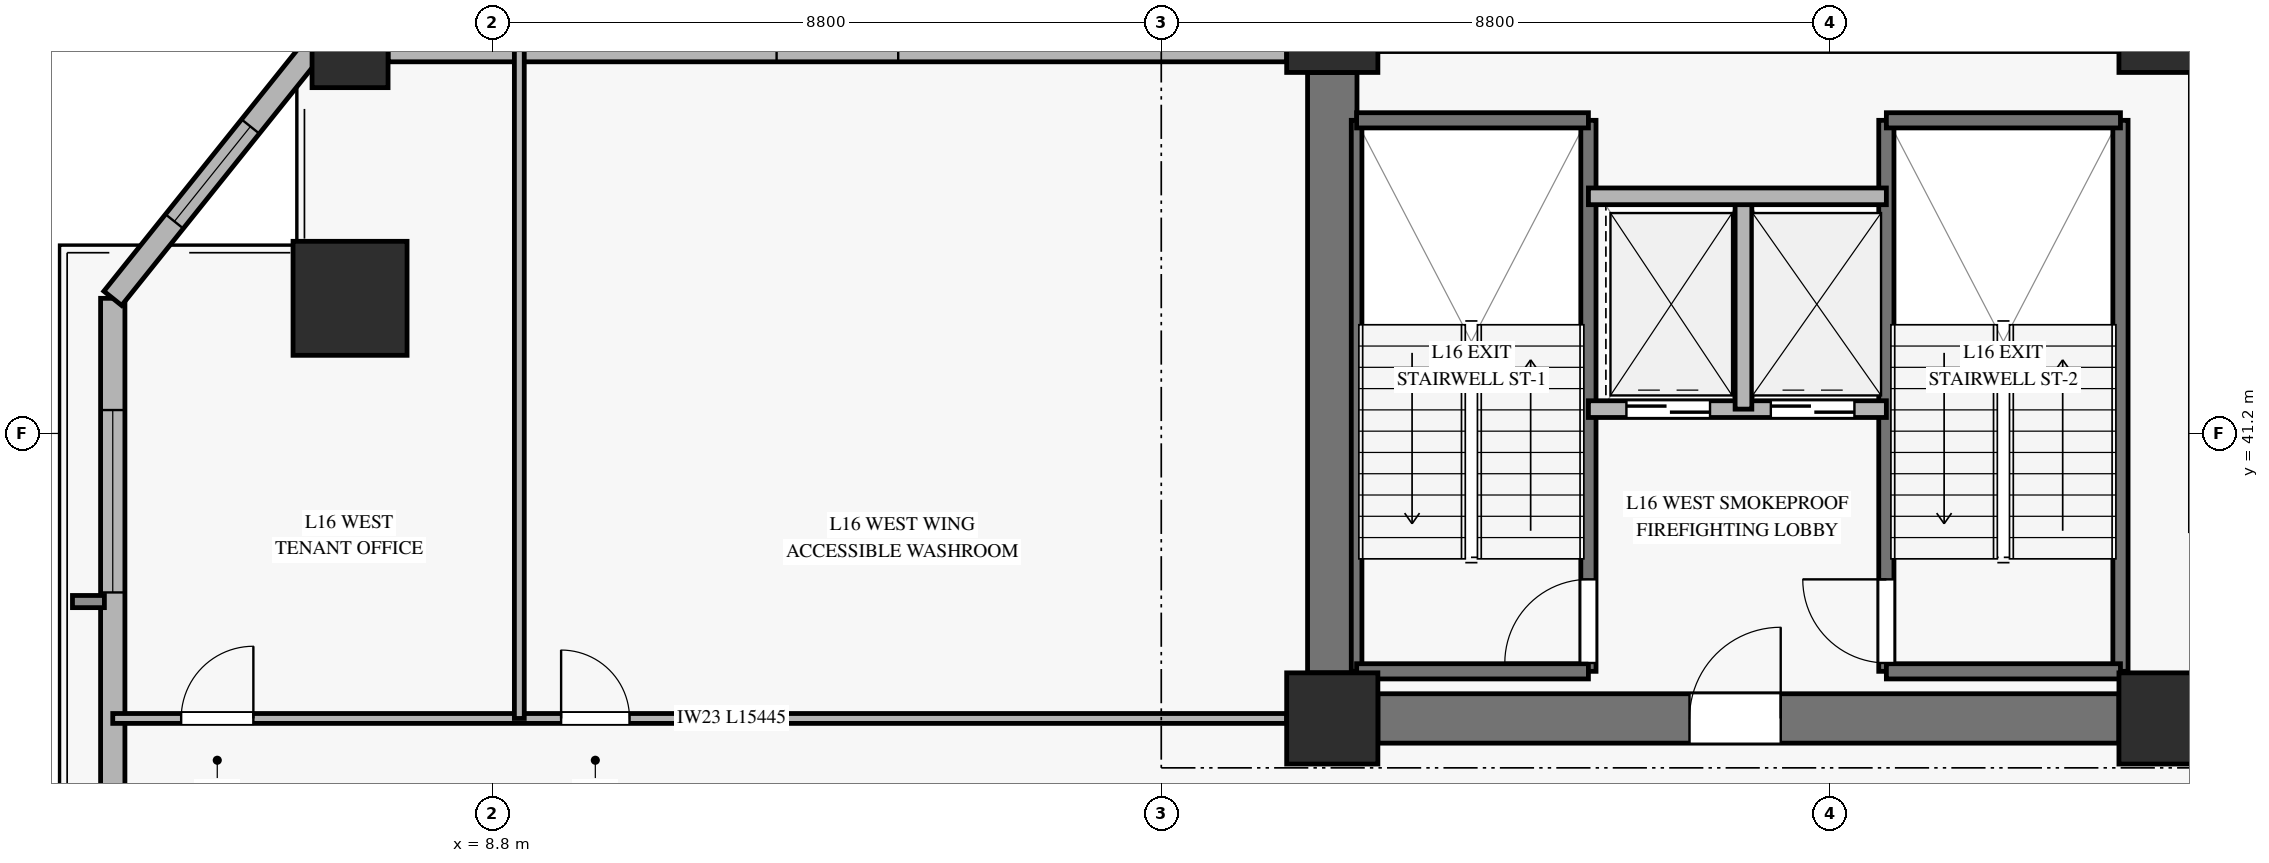
"""IFC4 building model, lengths in metres.
Left out: names, types, materials, properties, quantities, classifications, styles, units other than length and angle.
Written with IfcOpenShell. Run it as: python <this file> out.ifc"""

import sys

from ifc_helpers import new_model, si_unit, direction, frame, frame_2d, origin, origin_2d, place, context, subcontext, project, spatial, rectangle, hollow_rectangle, extrude, source, transform, mapped, element, fill, save


model = new_model("IFC4")
c1 = context("Model", 3, precision=1e-05, world=origin(), true_north=direction((0.0, 1.0)))
c2 = subcontext(c1, "Body", "Model", "MODEL_VIEW")
j1 = project(units=[si_unit("LENGTHUNIT", "METRE"), si_unit("PLANEANGLEUNIT", "RADIAN")], contexts=[c1])
p1 = place(None, origin())
s1 = spatial("IfcSite", under=j1, at=p1, CompositionType="ELEMENT")
p2 = place(p1, origin())
s2 = spatial("IfcBuilding", under=s1, at=p2, CompositionType="ELEMENT")
p3 = place(p2, frame((0.0, 0.0, 65.0)))
s3 = spatial("IfcBuildingStorey", under=s2, at=p3, CompositionType="ELEMENT", Elevation=65.0)
m1 = source(origin(), c2, "Body", "SweptSolid", [
    extrude(rectangle(XDim=1.2, YDim=1.2, at=origin_2d()), origin(), (0.0, 0.0, 1.0), 3.68),
])
for number, where, z_axis, x_axis in (
    (1, (19.85, 37.45, 0.0), (0.0, 0.0, 1.0), (1.0, 0.0, 0.0)),
    (2, (19.85, 46.55, 0.0), (0.0, 0.0, 1.0), (1.0, 0.0, 0.0)),
    (3, (30.8, 37.45, 0.0), (0.0, 0.0, 1.0), (1.0, 0.0, 0.0)),
    (4, (30.8, 46.55, 0.0), (0.0, 0.0, 1.0), (1.0, 0.0, 0.0)),
):
    element("IfcColumn", number, at=place(p3, frame(where, z_axis=z_axis, x_axis=x_axis)), inside=s3, PredefinedType="PILASTER", context=c2, shape_type="MappedRepresentation", body=[
        mapped(m1, transform((0.0, 0.0, 0.0), x_axis=(1.0, 0.0, 0.0), y_axis=(0.0, 1.0, 0.0), z_axis=(0.0, 0.0, 1.0), scale=1.0)),
    ])
p4 = place(p3, frame((20.45, 37.45, 0.0), z_axis=(0.0, 0.0, 1.0), x_axis=(1.0, 0.0, 0.0)))
e5 = element("IfcWall", 5, at=p4, inside=s3, PredefinedType="SHEAR", context=c2, shape_type="SweptSolid", body=[
    extrude(rectangle(XDim=9.75, YDim=0.65, at=frame_2d((4.875, 0.0))), origin(), (0.0, 0.0, 1.0), 3.68),
])
p5 = place(p4, frame((4.1, 0.0, 0.0)))
e6 = element("IfcOpeningElement", 6, at=p5, cuts=e5, PredefinedType="OPENING", context=c2, shape_type="SweptSolid", body=[
    extrude(rectangle(XDim=1.2, YDim=2.15, at=frame_2d((0.6, 1.075))), frame((0.0, 0.335, 0.0), z_axis=(0.0, -1.0, 0.0), x_axis=(1.0, 0.0, 0.0)), (0.0, 0.0, 1.0), 0.67),
])
p6 = place(p3, frame((19.85, 38.05, 0.0), z_axis=(0.0, 0.0, 1.0), x_axis=(0.0, 1.0, 0.0)))
e7 = element("IfcWall", 7, at=p6, inside=s3, PredefinedType="SHEAR", context=c2, shape_type="SweptSolid", body=[
    extrude(rectangle(XDim=7.9, YDim=0.65, at=frame_2d((3.95, 0.0))), origin(), (0.0, 0.0, 1.0), 3.68),
])
m2 = source(origin(), c2, "Body", "SweptSolid", [
    extrude(hollow_rectangle(XDim=1.5, YDim=1.5, WallThickness=0.07, at=origin_2d()), origin(), (0.0, 0.0, 1.0), 3.68),
])
p7 = place(p3, frame((6.927, 42.978, 0.0), z_axis=(0.0, 0.0, 1.0), x_axis=(1.0, 0.0, 0.0)))
e8 = element("IfcColumn", 8, at=p7, inside=s3, PredefinedType="COLUMN", context=c2, shape_type="MappedRepresentation", body=[
    mapped(m2, transform((0.0, 0.0, 0.0), x_axis=(1.0, 0.0, 0.0), y_axis=(0.0, 1.0, 0.0), z_axis=(0.0, 0.0, 1.0), scale=1.0)),
])
m3 = source(origin(), c2, "Body", "SweptSolid", [
    extrude(hollow_rectangle(XDim=1.0, YDim=1.0, WallThickness=0.045, at=origin_2d()), origin(), (0.0, 0.0, 1.0), 3.68),
])
p8 = place(p3, frame((6.927, 46.25, 0.0), z_axis=(0.0, 0.0, 1.0), x_axis=(1.0, 0.0, 0.0)))
e9 = element("IfcColumn", 9, at=p8, inside=s3, PredefinedType="COLUMN", context=c2, shape_type="MappedRepresentation", body=[
    mapped(m3, transform((0.0, 0.0, 0.0), x_axis=(1.0, 0.0, 0.0), y_axis=(0.0, 1.0, 0.0), z_axis=(0.0, 0.0, 1.0), scale=1.0)),
])
p9 = place(p3, frame((3.805, 25.991, 0.0), z_axis=(0.0, 0.0, 1.0), x_axis=(0.0, 1.0, 0.0)))
e10 = element("IfcWall", 10, at=p9, inside=s3, PredefinedType="SOLIDWALL", context=c2, shape_type="SweptSolid", body=[
    extrude(rectangle(XDim=16.987, YDim=0.32, at=frame_2d((8.494, 0.0))), origin(), (0.0, 0.0, 1.0), 3.16),
])
p10 = place(p9, frame((1.353, 0.0, 0.45)))
e11 = element("IfcOpeningElement", 11, at=p10, cuts=e10, PredefinedType="OPENING", context=c2, shape_type="SweptSolid", body=[
    extrude(rectangle(XDim=2.4, YDim=2.1, at=frame_2d((1.2, 1.05))), frame((0.0, 0.17, 0.0), z_axis=(0.0, -1.0, 0.0), x_axis=(1.0, 0.0, 0.0)), (0.0, 0.0, 1.0), 0.34),
])
p11 = place(p9, frame((13.117, 0.0, 0.45)))
e12 = element("IfcOpeningElement", 12, at=p11, cuts=e10, PredefinedType="OPENING", context=c2, shape_type="SweptSolid", body=[
    extrude(rectangle(XDim=2.4, YDim=2.1, at=frame_2d((1.2, 1.05))), frame((0.0, 0.17, 0.0), z_axis=(0.0, -1.0, 0.0), x_axis=(1.0, 0.0, 0.0)), (0.0, 0.0, 1.0), 0.34),
])
p12 = place(p3, frame((7.427, 46.25, 0.0), z_axis=(0.0, 0.0, 1.0), x_axis=(1.0, 0.0, 0.0)))
e13 = element("IfcWall", 13, at=p12, inside=s3, PredefinedType="SOLIDWALL", context=c2, shape_type="SweptSolid", body=[
    extrude(rectangle(XDim=11.823, YDim=0.32, at=frame_2d((5.912, 0.0))), origin(), (0.0, 0.0, 1.0), 3.16),
])
p13 = place(p12, frame((5.112, 0.0, 0.45)))
e14 = element("IfcOpeningElement", 14, at=p13, cuts=e13, PredefinedType="OPENING", context=c2, shape_type="SweptSolid", body=[
    extrude(rectangle(XDim=1.6, YDim=2.0, at=frame_2d((0.8, 1.0))), frame((0.0, 0.17, 0.0), z_axis=(0.0, -1.0, 0.0), x_axis=(1.0, 0.0, 0.0)), (0.0, 0.0, 1.0), 0.34),
])
p14 = place(p3, frame((6.427, 46.25, 0.0), z_axis=(0.0, 0.0, 1.0), x_axis=(-0.625348097159, -0.780345921614, 0.0)))
e15 = element("IfcWall", 15, at=p14, inside=s3, PredefinedType="SOLIDWALL", context=c2, shape_type="SweptSolid", body=[
    extrude(rectangle(XDim=4.193, YDim=0.3, at=frame_2d((2.096, 0.0))), origin(), (0.0, 0.0, 1.0), 3.16),
])
p15 = place(p14, frame((1.296, 0.0, 0.45)))
e16 = element("IfcOpeningElement", 16, at=p15, cuts=e15, PredefinedType="OPENING", context=c2, shape_type="SweptSolid", body=[
    extrude(rectangle(XDim=1.6, YDim=2.0, at=frame_2d((0.8, 1.0))), frame((0.0, 0.16, 0.0), z_axis=(0.0, -1.0, 0.0), x_axis=(1.0, 0.0, 0.0)), (0.0, 0.0, 1.0), 0.32),
])
p16 = place(p3, frame((20.17, 38.07, 0.0), z_axis=(0.0, 0.0, 1.0), x_axis=(0.0, 1.0, 0.0)))
e17 = element("IfcWall", 17, at=p16, inside=s3, PredefinedType="SOLIDWALL", context=c2, shape_type="SweptSolid", body=[
    extrude(rectangle(XDim=7.25, YDim=0.14, at=frame_2d((3.625, 0.0))), origin(), (0.0, 0.0, 1.0), 3.9),
])
p17 = place(p3, frame((23.22, 38.07, 0.0), z_axis=(0.0, 0.0, 1.0), x_axis=(0.0, 1.0, 0.0)))
e18 = element("IfcWall", 18, at=p17, inside=s3, PredefinedType="SOLIDWALL", context=c2, shape_type="SweptSolid", body=[
    extrude(rectangle(XDim=7.25, YDim=0.2, at=frame_2d((3.625, 0.0))), origin(), (0.0, 0.0, 1.0), 3.9),
])
p18 = place(p17, frame((0.11, 0.0, 0.0)))
e19 = element("IfcOpeningElement", 19, at=p18, cuts=e18, PredefinedType="OPENING", context=c2, shape_type="SweptSolid", body=[
    extrude(rectangle(XDim=1.1, YDim=2.15, at=frame_2d((0.55, 1.075))), frame((0.0, 0.11, 0.0), z_axis=(0.0, -1.0, 0.0), x_axis=(1.0, 0.0, 0.0)), (0.0, 0.0, 1.0), 0.22),
])
for number, where, z_axis, x_axis in (
    (20, (20.17, 45.32, 0.0), (0.0, 0.0, 1.0), (1.0, 0.0, 0.0)),
    (21, (20.17, 38.07, 0.0), (0.0, 0.0, 1.0), (1.0, 0.0, 0.0)),
):
    element("IfcWall", number, at=place(p3, frame(where, z_axis=z_axis, x_axis=x_axis)), inside=s3, PredefinedType="SOLIDWALL", context=c2, shape_type="SweptSolid", body=[
        extrude(rectangle(XDim=3.05, YDim=0.2, at=frame_2d((1.525, 0.0))), origin(), (0.0, 0.0, 1.0), 3.9),
    ])
p19 = place(p3, frame((27.14, 38.07, 0.0), z_axis=(0.0, 0.0, 1.0), x_axis=(0.0, 1.0, 0.0)))
e22 = element("IfcWall", 22, at=p19, inside=s3, PredefinedType="SOLIDWALL", context=c2, shape_type="SweptSolid", body=[
    extrude(rectangle(XDim=7.25, YDim=0.2, at=frame_2d((3.625, 0.0))), origin(), (0.0, 0.0, 1.0), 3.9),
])
p20 = place(p19, frame((0.11, 0.0, 0.0)))
e23 = element("IfcOpeningElement", 23, at=p20, cuts=e22, PredefinedType="OPENING", context=c2, shape_type="SweptSolid", body=[
    extrude(rectangle(XDim=1.1, YDim=2.15, at=frame_2d((0.55, 1.075))), frame((0.0, 0.11, 0.0), z_axis=(0.0, -1.0, 0.0), x_axis=(1.0, 0.0, 0.0)), (0.0, 0.0, 1.0), 0.22),
])
p21 = place(p3, frame((30.22, 38.07, 0.0), z_axis=(0.0, 0.0, 1.0), x_axis=(0.0, 1.0, 0.0)))
e24 = element("IfcWall", 24, at=p21, inside=s3, PredefinedType="SOLIDWALL", context=c2, shape_type="SweptSolid", body=[
    extrude(rectangle(XDim=7.25, YDim=0.2, at=frame_2d((3.625, 0.0))), origin(), (0.0, 0.0, 1.0), 3.9),
])
for number, where, z_axis, x_axis in (
    (25, (27.14, 45.32, 0.0), (0.0, 0.0, 1.0), (1.0, 0.0, 0.0)),
    (26, (27.14, 38.07, 0.0), (0.0, 0.0, 1.0), (1.0, 0.0, 0.0)),
):
    element("IfcWall", number, at=place(p3, frame(where, z_axis=z_axis, x_axis=x_axis)), inside=s3, PredefinedType="SOLIDWALL", context=c2, shape_type="SweptSolid", body=[
        extrude(rectangle(XDim=3.08, YDim=0.2, at=frame_2d((1.54, 0.0))), origin(), (0.0, 0.0, 1.0), 3.9),
    ])
p22 = place(p3, frame((23.22, 41.52, 0.0), z_axis=(0.0, 0.0, 1.0), x_axis=(1.0, 0.0, 0.0)))
e27 = element("IfcWall", 27, at=p22, inside=s3, PredefinedType="SOLIDWALL", context=c2, shape_type="SweptSolid", body=[
    extrude(rectangle(XDim=3.92, YDim=0.22, at=frame_2d((1.96, 0.0))), origin(), (0.0, 0.0, 1.0), 3.68),
])
p23 = place(p22, frame((0.5, 0.0, 0.0)))
e28 = element("IfcOpeningElement", 28, at=p23, cuts=e27, PredefinedType="OPENING", context=c2, shape_type="SweptSolid", body=[
    extrude(rectangle(XDim=1.1, YDim=2.2, at=frame_2d((0.55, 1.1))), frame((0.0, 0.12, 0.0), z_axis=(0.0, -1.0, 0.0), x_axis=(1.0, 0.0, 0.0)), (0.0, 0.0, 1.0), 0.24),
])
p24 = place(p22, frame((2.4, 0.0, 0.0)))
e29 = element("IfcOpeningElement", 29, at=p24, cuts=e27, PredefinedType="OPENING", context=c2, shape_type="SweptSolid", body=[
    extrude(rectangle(XDim=1.1, YDim=2.2, at=frame_2d((0.55, 1.1))), frame((0.0, 0.12, 0.0), z_axis=(0.0, -1.0, 0.0), x_axis=(1.0, 0.0, 0.0)), (0.0, 0.0, 1.0), 0.24),
])
p25 = place(p3, frame((25.26, 41.52, 0.0), z_axis=(0.0, 0.0, 1.0), x_axis=(0.0, 1.0, 0.0)))
e30 = element("IfcWall", 30, at=p25, inside=s3, PredefinedType="SOLIDWALL", context=c2, shape_type="SweptSolid", body=[
    extrude(rectangle(XDim=2.8, YDim=0.22, at=frame_2d((1.4, 0.0))), origin(), (0.0, 0.0, 1.0), 3.68),
])
p26 = place(p3, frame((23.22, 44.32, 0.0), z_axis=(0.0, 0.0, 1.0), x_axis=(1.0, 0.0, 0.0)))
e31 = element("IfcWall", 31, at=p26, inside=s3, PredefinedType="SOLIDWALL", context=c2, shape_type="SweptSolid", body=[
    extrude(rectangle(XDim=3.92, YDim=0.22, at=frame_2d((1.96, 0.0))), origin(), (0.0, 0.0, 1.0), 3.68),
])
p27 = place(p3, frame((3.805, 37.45, 0.0), z_axis=(0.0, 0.0, 1.0), x_axis=(1.0, 0.0, 0.0)))
e32 = element("IfcWall", 32, at=p27, inside=s3, PredefinedType="PARTITIONING", context=c2, shape_type="SweptSolid", body=[
    extrude(rectangle(XDim=15.445, YDim=0.13, at=frame_2d((7.723, 0.0))), origin(), (0.0, 0.0, 1.0), 3.165),
])
p28 = place(p27, frame((0.9, 0.0, 0.0)))
e33 = element("IfcOpeningElement", 33, at=p28, cuts=e32, PredefinedType="OPENING", context=c2, shape_type="SweptSolid", body=[
    extrude(rectangle(XDim=0.95, YDim=2.1, at=frame_2d((0.475, 1.05))), frame((0.0, 0.075, 0.0), z_axis=(0.0, -1.0, 0.0), x_axis=(1.0, 0.0, 0.0)), (0.0, 0.0, 1.0), 0.15),
])
p29 = place(p27, frame((5.899, 0.0, 0.0)))
e34 = element("IfcOpeningElement", 34, at=p29, cuts=e32, PredefinedType="OPENING", context=c2, shape_type="SweptSolid", body=[
    extrude(rectangle(XDim=0.9, YDim=2.1, at=frame_2d((0.45, 1.05))), frame((0.0, 0.075, 0.0), z_axis=(0.0, -1.0, 0.0), x_axis=(1.0, 0.0, 0.0)), (0.0, 0.0, 1.0), 0.15),
])
p30 = place(p3, frame((9.154, 37.45, 0.0), z_axis=(0.0, 0.0, 1.0), x_axis=(0.0, 1.0, 0.0)))
e35 = element("IfcWall", 35, at=p30, inside=s3, PredefinedType="PARTITIONING", context=c2, shape_type="SweptSolid", body=[
    extrude(rectangle(XDim=8.8, YDim=0.13, at=frame_2d((4.4, 0.0))), origin(), (0.0, 0.0, 1.0), 3.68),
])
m4 = source(origin(), c2, "Body", "SweptSolid", [
    extrude(rectangle(XDim=2.4, YDim=2.1, at=frame_2d((1.2, 1.05))), frame((0.0, 0.03, 0.0), z_axis=(0.0, -1.0, 0.0), x_axis=(1.0, 0.0, 0.0)), (0.0, 0.0, 1.0), 0.06),
])
p31 = place(p11, origin())
e36 = element("IfcWindow", 36, at=p31, inside=s3, PartitioningType="SINGLE_PANEL", PredefinedType="WINDOW", context=c2, shape_type="MappedRepresentation", body=[
    mapped(m4, transform((0.0, 0.0, 0.0), x_axis=(1.0, 0.0, 0.0), y_axis=(0.0, 1.0, 0.0), z_axis=(0.0, 0.0, 1.0), scale=1.0)),
])
fill(e12, e36)
m5 = source(origin(), c2, "Body", "SweptSolid", [
    extrude(rectangle(XDim=1.6, YDim=2.0, at=frame_2d((0.8, 1.0))), frame((0.0, 0.03, 0.0), z_axis=(0.0, -1.0, 0.0), x_axis=(1.0, 0.0, 0.0)), (0.0, 0.0, 1.0), 0.06),
])
p32 = place(p15, origin())
e37 = element("IfcWindow", 37, at=p32, inside=s3, PartitioningType="SINGLE_PANEL", PredefinedType="WINDOW", context=c2, shape_type="MappedRepresentation", body=[
    mapped(m5, transform((0.0, 0.0, 0.0), x_axis=(1.0, 0.0, 0.0), y_axis=(0.0, 1.0, 0.0), z_axis=(0.0, 0.0, 1.0), scale=1.0)),
])
fill(e16, e37)
m6 = source(origin(), c2, "Body", "SweptSolid", [
    extrude(rectangle(XDim=1.1, YDim=2.15, at=frame_2d((0.55, 1.075))), frame((0.0, 0.025, 0.0), z_axis=(0.0, -1.0, 0.0), x_axis=(1.0, 0.0, 0.0)), (0.0, 0.0, 1.0), 0.05),
])
p33 = place(p18, origin())
e38 = element("IfcDoor", 38, at=p33, inside=s3, OperationType="SINGLE_SWING_LEFT", PredefinedType="DOOR", context=c2, shape_type="MappedRepresentation", body=[
    mapped(m6, transform((0.0, 0.0, 0.0), x_axis=(1.0, 0.0, 0.0), y_axis=(0.0, 1.0, 0.0), z_axis=(0.0, 0.0, 1.0), scale=1.0)),
])
fill(e19, e38)
p34 = place(p20, origin())
e39 = element("IfcDoor", 39, at=p34, inside=s3, OperationType="SINGLE_SWING_RIGHT", PredefinedType="DOOR", context=c2, shape_type="MappedRepresentation", body=[
    mapped(m6, transform((0.0, 0.0, 0.0), x_axis=(1.0, 0.0, 0.0), y_axis=(0.0, 1.0, 0.0), z_axis=(0.0, 0.0, 1.0), scale=1.0)),
])
fill(e23, e39)
m7 = source(origin(), c2, "Body", "SweptSolid", [
    extrude(rectangle(XDim=1.1, YDim=2.2, at=frame_2d((0.55, 1.1))), frame((0.0, 0.025, 0.0), z_axis=(0.0, -1.0, 0.0), x_axis=(1.0, 0.0, 0.0)), (0.0, 0.0, 1.0), 0.05),
])
p35 = place(p23, origin())
e40 = element("IfcDoor", 40, at=p35, inside=s3, OperationType="SLIDING_TO_LEFT", PredefinedType="DOOR", context=c2, shape_type="MappedRepresentation", body=[
    mapped(m7, transform((0.0, 0.0, 0.0), x_axis=(1.0, 0.0, 0.0), y_axis=(0.0, 1.0, 0.0), z_axis=(0.0, 0.0, 1.0), scale=1.0)),
])
fill(e28, e40)
p36 = place(p24, origin())
e41 = element("IfcDoor", 41, at=p36, inside=s3, OperationType="SLIDING_TO_LEFT", PredefinedType="DOOR", context=c2, shape_type="MappedRepresentation", body=[
    mapped(m7, transform((0.0, 0.0, 0.0), x_axis=(1.0, 0.0, 0.0), y_axis=(0.0, 1.0, 0.0), z_axis=(0.0, 0.0, 1.0), scale=1.0)),
])
fill(e29, e41)
m8 = source(origin(), c2, "Body", "SweptSolid", [
    extrude(rectangle(XDim=1.2, YDim=2.15, at=frame_2d((0.6, 1.075))), frame((0.0, 0.025, 0.0), z_axis=(0.0, -1.0, 0.0), x_axis=(1.0, 0.0, 0.0)), (0.0, 0.0, 1.0), 0.05),
])
p37 = place(p5, origin())
e42 = element("IfcDoor", 42, at=p37, inside=s3, OperationType="SINGLE_SWING_RIGHT", PredefinedType="DOOR", context=c2, shape_type="MappedRepresentation", body=[
    mapped(m8, transform((0.0, 0.0, 0.0), x_axis=(1.0, 0.0, 0.0), y_axis=(0.0, 1.0, 0.0), z_axis=(0.0, 0.0, 1.0), scale=1.0)),
])
fill(e6, e42)
m9 = source(origin(), c2, "Body", "SweptSolid", [
    extrude(rectangle(XDim=0.95, YDim=2.1, at=frame_2d((0.475, 1.05))), frame((0.0, 0.025, 0.0), z_axis=(0.0, -1.0, 0.0), x_axis=(1.0, 0.0, 0.0)), (0.0, 0.0, 1.0), 0.05),
])
p38 = place(p28, origin())
e43 = element("IfcDoor", 43, at=p38, inside=s3, OperationType="SINGLE_SWING_RIGHT", PredefinedType="DOOR", context=c2, shape_type="MappedRepresentation", body=[
    mapped(m9, transform((0.0, 0.0, 0.0), x_axis=(1.0, 0.0, 0.0), y_axis=(0.0, 1.0, 0.0), z_axis=(0.0, 0.0, 1.0), scale=1.0)),
])
fill(e33, e43)
m10 = source(origin(), c2, "Body", "SweptSolid", [
    extrude(rectangle(XDim=0.9, YDim=2.1, at=frame_2d((0.45, 1.05))), frame((0.0, 0.025, 0.0), z_axis=(0.0, -1.0, 0.0), x_axis=(1.0, 0.0, 0.0)), (0.0, 0.0, 1.0), 0.05),
])
p39 = place(p29, origin())
e44 = element("IfcDoor", 44, at=p39, inside=s3, OperationType="SINGLE_SWING_LEFT", PredefinedType="DOOR", context=c2, shape_type="MappedRepresentation", body=[
    mapped(m10, transform((0.0, 0.0, 0.0), x_axis=(1.0, 0.0, 0.0), y_axis=(0.0, 1.0, 0.0), z_axis=(0.0, 0.0, 1.0), scale=1.0)),
])
fill(e34, e44)
save(model, sys.argv[1])
